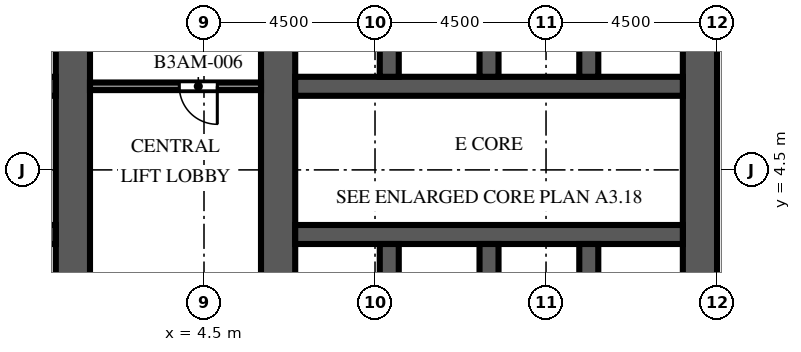
"""IFC4 building model, lengths in metres.
Left out: names, types, materials, properties, quantities, classifications, styles, units other than length and angle.
Written with IfcOpenShell. Run it as: python <this file> out.ifc"""

import sys

from ifc_helpers import new_model, si_unit, direction, frame, frame_2d, origin, place, context, subcontext, project, spatial, rectangle, extrude, element, fill, save


model = new_model("IFC4")
c1 = context("Model", 3, precision=1e-05, world=origin(), true_north=direction((0.0, 1.0)))
c2 = subcontext(c1, "Body", "Model", "MODEL_VIEW")
j1 = project(units=[si_unit("LENGTHUNIT", "METRE"), si_unit("PLANEANGLEUNIT", "RADIAN")], contexts=[c1])
p1 = place(None, origin())
s1 = spatial("IfcSite", under=j1, at=p1, CompositionType="ELEMENT")
p2 = place(p1, origin())
s2 = spatial("IfcBuilding", under=s1, at=p2, CompositionType="ELEMENT")
p3 = place(p2, frame((0.0, 0.0, 110.7)))
s3 = spatial("IfcBuildingStorey", under=s2, at=p3, CompositionType="ELEMENT", Elevation=110.7)
p4 = place(p3, frame((1.05, -9.0, 0.0), z_axis=(0.0, 0.0, 1.0), x_axis=(0.0, 1.0, 0.0)))
e1 = element("IfcWall", 1, at=p4, inside=s3, PredefinedType="SHEAR", context=c2, shape_type="SweptSolid", body=[
    extrude(rectangle(XDim=27.5, YDim=0.9, at=frame_2d((13.75, 0.0))), origin(), (0.0, 0.0, 1.0), 6.0),
])
p5 = place(p4, frame((12.55, 0.0, 0.0)))
e2 = element("IfcOpeningElement", 2, at=p5, cuts=e1, PredefinedType="OPENING", context=c2, shape_type="SweptSolid", body=[
    extrude(rectangle(XDim=2.4, YDim=2.4, at=frame_2d((1.2, 1.2))), frame((0.0, 0.46, 0.0), z_axis=(0.0, -1.0, 0.0), x_axis=(1.0, 0.0, 0.0)), (0.0, 0.0, 1.0), 0.92),
])
p6 = place(p4, frame((3.975, 0.0, 0.0)))
e3 = element("IfcOpeningElement", 3, at=p6, cuts=e1, PredefinedType="OPENING", context=c2, shape_type="SweptSolid", body=[
    extrude(rectangle(XDim=1.2, YDim=2.1, at=frame_2d((0.6, 1.05))), frame((0.0, 0.46, 0.0), z_axis=(0.0, -1.0, 0.0), x_axis=(1.0, 0.0, 0.0)), (0.0, 0.0, 1.0), 0.92),
])
p7 = place(p4, frame((19.485, 0.0, 0.0)))
e4 = element("IfcOpeningElement", 4, at=p7, cuts=e1, PredefinedType="OPENING", context=c2, shape_type="SweptSolid", body=[
    extrude(rectangle(XDim=1.0, YDim=2.1, at=frame_2d((0.5, 1.05))), frame((0.0, 0.46, 0.0), z_axis=(0.0, -1.0, 0.0), x_axis=(1.0, 0.0, 0.0)), (0.0, 0.0, 1.0), 0.92),
])
p8 = place(p4, frame((21.139, 0.0, 0.0)))
e5 = element("IfcOpeningElement", 5, at=p8, cuts=e1, PredefinedType="OPENING", context=c2, shape_type="SweptSolid", body=[
    extrude(rectangle(XDim=1.0, YDim=2.1, at=frame_2d((0.5, 1.05))), frame((0.0, 0.46, 0.0), z_axis=(0.0, -1.0, 0.0), x_axis=(1.0, 0.0, 0.0)), (0.0, 0.0, 1.0), 0.92),
])
p9 = place(p4, frame((23.16, 0.0, 0.0)))
e6 = element("IfcOpeningElement", 6, at=p9, cuts=e1, PredefinedType="OPENING", context=c2, shape_type="SweptSolid", body=[
    extrude(rectangle(XDim=1.0, YDim=2.1, at=frame_2d((0.5, 1.05))), frame((0.0, 0.46, 0.0), z_axis=(0.0, -1.0, 0.0), x_axis=(1.0, 0.0, 0.0)), (0.0, 0.0, 1.0), 0.92),
])
p10 = place(p4, frame((25.181, 0.0, 0.0)))
e7 = element("IfcOpeningElement", 7, at=p10, cuts=e1, PredefinedType="OPENING", context=c2, shape_type="SweptSolid", body=[
    extrude(rectangle(XDim=1.0, YDim=2.1, at=frame_2d((0.5, 1.05))), frame((0.0, 0.46, 0.0), z_axis=(0.0, -1.0, 0.0), x_axis=(1.0, 0.0, 0.0)), (0.0, 0.0, 1.0), 0.92),
])
p11 = place(p3, frame((-9.6, 2.8, 0.0), z_axis=(0.0, 0.0, 1.0), x_axis=(1.0, 0.0, 0.0)))
e8 = element("IfcWall", 8, at=p11, inside=s3, PredefinedType="SHEAR", context=c2, shape_type="SweptSolid", body=[
    extrude(rectangle(XDim=10.2, YDim=0.5, at=frame_2d((5.1, 0.0))), origin(), (0.0, 0.0, 1.0), 6.0),
])
p12 = place(p11, frame((0.562, 0.0, 0.0)))
e9 = element("IfcOpeningElement", 9, at=p12, cuts=e8, PredefinedType="OPENING", context=c2, shape_type="SweptSolid", body=[
    extrude(rectangle(XDim=1.1, YDim=2.1, at=frame_2d((0.55, 1.05))), frame((0.0, 0.26, 0.0), z_axis=(0.0, -1.0, 0.0), x_axis=(1.0, 0.0, 0.0)), (0.0, 0.0, 1.0), 0.52),
])
p13 = place(p11, frame((3.238, 0.0, 0.0)))
e10 = element("IfcOpeningElement", 10, at=p13, cuts=e8, PredefinedType="OPENING", context=c2, shape_type="SweptSolid", body=[
    extrude(rectangle(XDim=1.1, YDim=2.1, at=frame_2d((0.55, 1.05))), frame((0.0, 0.26, 0.0), z_axis=(0.0, -1.0, 0.0), x_axis=(1.0, 0.0, 0.0)), (0.0, 0.0, 1.0), 0.52),
])
p14 = place(p11, frame((8.538, 0.0, 0.0)))
e11 = element("IfcOpeningElement", 11, at=p14, cuts=e8, PredefinedType="OPENING", context=c2, shape_type="SweptSolid", body=[
    extrude(rectangle(XDim=1.1, YDim=2.1, at=frame_2d((0.55, 1.05))), frame((0.0, 0.26, 0.0), z_axis=(0.0, -1.0, 0.0), x_axis=(1.0, 0.0, 0.0)), (0.0, 0.0, 1.0), 0.52),
])
p15 = place(p3, frame((-9.6, 6.7, 0.0), z_axis=(0.0, 0.0, 1.0), x_axis=(1.0, 0.0, 0.0)))
e12 = element("IfcWall", 12, at=p15, inside=s3, PredefinedType="SHEAR", context=c2, shape_type="SweptSolid", body=[
    extrude(rectangle(XDim=10.2, YDim=0.5, at=frame_2d((5.1, 0.0))), origin(), (0.0, 0.0, 1.0), 6.0),
])
p16 = place(p15, frame((0.562, 0.0, 0.0)))
e13 = element("IfcOpeningElement", 13, at=p16, cuts=e12, PredefinedType="OPENING", context=c2, shape_type="SweptSolid", body=[
    extrude(rectangle(XDim=1.1, YDim=2.1, at=frame_2d((0.55, 1.05))), frame((0.0, 0.26, 0.0), z_axis=(0.0, -1.0, 0.0), x_axis=(1.0, 0.0, 0.0)), (0.0, 0.0, 1.0), 0.52),
])
p17 = place(p15, frame((3.288, 0.0, 0.0)))
e14 = element("IfcOpeningElement", 14, at=p17, cuts=e12, PredefinedType="OPENING", context=c2, shape_type="SweptSolid", body=[
    extrude(rectangle(XDim=1.0, YDim=2.1, at=frame_2d((0.5, 1.05))), frame((0.0, 0.26, 0.0), z_axis=(0.0, -1.0, 0.0), x_axis=(1.0, 0.0, 0.0)), (0.0, 0.0, 1.0), 0.52),
])
p18 = place(p15, frame((5.913, 0.0, 0.0)))
e15 = element("IfcOpeningElement", 15, at=p18, cuts=e12, PredefinedType="OPENING", context=c2, shape_type="SweptSolid", body=[
    extrude(rectangle(XDim=1.0, YDim=2.1, at=frame_2d((0.5, 1.05))), frame((0.0, 0.26, 0.0), z_axis=(0.0, -1.0, 0.0), x_axis=(1.0, 0.0, 0.0)), (0.0, 0.0, 1.0), 0.52),
])
p19 = place(p15, frame((8.587, 0.0, 0.0)))
e16 = element("IfcOpeningElement", 16, at=p19, cuts=e12, PredefinedType="OPENING", context=c2, shape_type="SweptSolid", body=[
    extrude(rectangle(XDim=1.0, YDim=2.1, at=frame_2d((0.5, 1.05))), frame((0.0, 0.26, 0.0), z_axis=(0.0, -1.0, 0.0), x_axis=(1.0, 0.0, 0.0)), (0.0, 0.0, 1.0), 0.52),
])
p20 = place(p3, frame((6.45, -9.0, 0.0), z_axis=(0.0, 0.0, 1.0), x_axis=(0.0, 1.0, 0.0)))
e17 = element("IfcWall", 17, at=p20, inside=s3, PredefinedType="SHEAR", context=c2, shape_type="SweptSolid", body=[
    extrude(rectangle(XDim=27.5, YDim=0.9, at=frame_2d((13.75, 0.0))), origin(), (0.0, 0.0, 1.0), 6.0),
])
p21 = place(p20, frame((12.55, 0.0, 0.0)))
e18 = element("IfcOpeningElement", 18, at=p21, cuts=e17, PredefinedType="OPENING", context=c2, shape_type="SweptSolid", body=[
    extrude(rectangle(XDim=2.4, YDim=2.4, at=frame_2d((1.2, 1.2))), frame((0.0, 0.46, 0.0), z_axis=(0.0, -1.0, 0.0), x_axis=(1.0, 0.0, 0.0)), (0.0, 0.0, 1.0), 0.92),
])
p22 = place(p20, frame((3.975, 0.0, 0.0)))
e19 = element("IfcOpeningElement", 19, at=p22, cuts=e17, PredefinedType="OPENING", context=c2, shape_type="SweptSolid", body=[
    extrude(rectangle(XDim=1.2, YDim=2.1, at=frame_2d((0.6, 1.05))), frame((0.0, 0.46, 0.0), z_axis=(0.0, -1.0, 0.0), x_axis=(1.0, 0.0, 0.0)), (0.0, 0.0, 1.0), 0.92),
])
p23 = place(p20, frame((19.485, 0.0, 0.0)))
e20 = element("IfcOpeningElement", 20, at=p23, cuts=e17, PredefinedType="OPENING", context=c2, shape_type="SweptSolid", body=[
    extrude(rectangle(XDim=1.0, YDim=2.1, at=frame_2d((0.5, 1.05))), frame((0.0, 0.46, 0.0), z_axis=(0.0, -1.0, 0.0), x_axis=(1.0, 0.0, 0.0)), (0.0, 0.0, 1.0), 0.92),
])
p24 = place(p20, frame((21.139, 0.0, 0.0)))
e21 = element("IfcOpeningElement", 21, at=p24, cuts=e17, PredefinedType="OPENING", context=c2, shape_type="SweptSolid", body=[
    extrude(rectangle(XDim=1.0, YDim=2.1, at=frame_2d((0.5, 1.05))), frame((0.0, 0.46, 0.0), z_axis=(0.0, -1.0, 0.0), x_axis=(1.0, 0.0, 0.0)), (0.0, 0.0, 1.0), 0.92),
])
p25 = place(p20, frame((23.16, 0.0, 0.0)))
e22 = element("IfcOpeningElement", 22, at=p25, cuts=e17, PredefinedType="OPENING", context=c2, shape_type="SweptSolid", body=[
    extrude(rectangle(XDim=1.0, YDim=2.1, at=frame_2d((0.5, 1.05))), frame((0.0, 0.46, 0.0), z_axis=(0.0, -1.0, 0.0), x_axis=(1.0, 0.0, 0.0)), (0.0, 0.0, 1.0), 0.92),
])
p26 = place(p20, frame((25.181, 0.0, 0.0)))
e23 = element("IfcOpeningElement", 23, at=p26, cuts=e17, PredefinedType="OPENING", context=c2, shape_type="SweptSolid", body=[
    extrude(rectangle(XDim=1.0, YDim=2.1, at=frame_2d((0.5, 1.05))), frame((0.0, 0.46, 0.0), z_axis=(0.0, -1.0, 0.0), x_axis=(1.0, 0.0, 0.0)), (0.0, 0.0, 1.0), 0.92),
])
p27 = place(p3, frame((17.55, -9.0, 0.0), z_axis=(0.0, 0.0, 1.0), x_axis=(0.0, 1.0, 0.0)))
e24 = element("IfcWall", 24, at=p27, inside=s3, PredefinedType="SHEAR", context=c2, shape_type="SweptSolid", body=[
    extrude(rectangle(XDim=27.5, YDim=0.9, at=frame_2d((13.75, 0.0))), origin(), (0.0, 0.0, 1.0), 6.0),
])
p28 = place(p27, frame((12.55, 0.0, 0.0)))
e25 = element("IfcOpeningElement", 25, at=p28, cuts=e24, PredefinedType="OPENING", context=c2, shape_type="SweptSolid", body=[
    extrude(rectangle(XDim=2.4, YDim=2.4, at=frame_2d((1.2, 1.2))), frame((0.0, 0.46, 0.0), z_axis=(0.0, -1.0, 0.0), x_axis=(1.0, 0.0, 0.0)), (0.0, 0.0, 1.0), 0.92),
])
p29 = place(p27, frame((6.825, 0.0, 0.0)))
e26 = element("IfcOpeningElement", 26, at=p29, cuts=e24, PredefinedType="OPENING", context=c2, shape_type="SweptSolid", body=[
    extrude(rectangle(XDim=1.2, YDim=2.1, at=frame_2d((0.6, 1.05))), frame((0.0, 0.46, 0.0), z_axis=(0.0, -1.0, 0.0), x_axis=(1.0, 0.0, 0.0)), (0.0, 0.0, 1.0), 0.92),
])
p30 = place(p27, frame((19.475, 0.0, 0.0)))
e27 = element("IfcOpeningElement", 27, at=p30, cuts=e24, PredefinedType="OPENING", context=c2, shape_type="SweptSolid", body=[
    extrude(rectangle(XDim=1.2, YDim=2.1, at=frame_2d((0.6, 1.05))), frame((0.0, 0.46, 0.0), z_axis=(0.0, -1.0, 0.0), x_axis=(1.0, 0.0, 0.0)), (0.0, 0.0, 1.0), 0.92),
])
p31 = place(p3, frame((6.9, 2.8, 0.0), z_axis=(0.0, 0.0, 1.0), x_axis=(1.0, 0.0, 0.0)))
e28 = element("IfcWall", 28, at=p31, inside=s3, PredefinedType="SHEAR", context=c2, shape_type="SweptSolid", body=[
    extrude(rectangle(XDim=10.2, YDim=0.5, at=frame_2d((5.1, 0.0))), origin(), (0.0, 0.0, 1.0), 6.0),
])
p32 = place(p31, frame((0.562, 0.0, 0.0)))
e29 = element("IfcOpeningElement", 29, at=p32, cuts=e28, PredefinedType="OPENING", context=c2, shape_type="SweptSolid", body=[
    extrude(rectangle(XDim=1.1, YDim=2.1, at=frame_2d((0.55, 1.05))), frame((0.0, 0.26, 0.0), z_axis=(0.0, -1.0, 0.0), x_axis=(1.0, 0.0, 0.0)), (0.0, 0.0, 1.0), 0.52),
])
p33 = place(p31, frame((3.238, 0.0, 0.0)))
e30 = element("IfcOpeningElement", 30, at=p33, cuts=e28, PredefinedType="OPENING", context=c2, shape_type="SweptSolid", body=[
    extrude(rectangle(XDim=1.1, YDim=2.1, at=frame_2d((0.55, 1.05))), frame((0.0, 0.26, 0.0), z_axis=(0.0, -1.0, 0.0), x_axis=(1.0, 0.0, 0.0)), (0.0, 0.0, 1.0), 0.52),
])
p34 = place(p31, frame((8.538, 0.0, 0.0)))
e31 = element("IfcOpeningElement", 31, at=p34, cuts=e28, PredefinedType="OPENING", context=c2, shape_type="SweptSolid", body=[
    extrude(rectangle(XDim=1.1, YDim=2.1, at=frame_2d((0.55, 1.05))), frame((0.0, 0.26, 0.0), z_axis=(0.0, -1.0, 0.0), x_axis=(1.0, 0.0, 0.0)), (0.0, 0.0, 1.0), 0.52),
])
p35 = place(p3, frame((6.9, 6.7, 0.0), z_axis=(0.0, 0.0, 1.0), x_axis=(1.0, 0.0, 0.0)))
e32 = element("IfcWall", 32, at=p35, inside=s3, PredefinedType="SHEAR", context=c2, shape_type="SweptSolid", body=[
    extrude(rectangle(XDim=10.2, YDim=0.5, at=frame_2d((5.1, 0.0))), origin(), (0.0, 0.0, 1.0), 6.0),
])
p36 = place(p35, frame((0.562, 0.0, 0.0)))
e33 = element("IfcOpeningElement", 33, at=p36, cuts=e32, PredefinedType="OPENING", context=c2, shape_type="SweptSolid", body=[
    extrude(rectangle(XDim=1.1, YDim=2.1, at=frame_2d((0.55, 1.05))), frame((0.0, 0.26, 0.0), z_axis=(0.0, -1.0, 0.0), x_axis=(1.0, 0.0, 0.0)), (0.0, 0.0, 1.0), 0.52),
])
p37 = place(p35, frame((3.288, 0.0, 0.0)))
e34 = element("IfcOpeningElement", 34, at=p37, cuts=e32, PredefinedType="OPENING", context=c2, shape_type="SweptSolid", body=[
    extrude(rectangle(XDim=1.0, YDim=2.1, at=frame_2d((0.5, 1.05))), frame((0.0, 0.26, 0.0), z_axis=(0.0, -1.0, 0.0), x_axis=(1.0, 0.0, 0.0)), (0.0, 0.0, 1.0), 0.52),
])
p38 = place(p35, frame((5.913, 0.0, 0.0)))
e35 = element("IfcOpeningElement", 35, at=p38, cuts=e32, PredefinedType="OPENING", context=c2, shape_type="SweptSolid", body=[
    extrude(rectangle(XDim=1.0, YDim=2.1, at=frame_2d((0.5, 1.05))), frame((0.0, 0.26, 0.0), z_axis=(0.0, -1.0, 0.0), x_axis=(1.0, 0.0, 0.0)), (0.0, 0.0, 1.0), 0.52),
])
p39 = place(p35, frame((8.587, 0.0, 0.0)))
e36 = element("IfcOpeningElement", 36, at=p39, cuts=e32, PredefinedType="OPENING", context=c2, shape_type="SweptSolid", body=[
    extrude(rectangle(XDim=1.0, YDim=2.1, at=frame_2d((0.5, 1.05))), frame((0.0, 0.26, 0.0), z_axis=(0.0, -1.0, 0.0), x_axis=(1.0, 0.0, 0.0)), (0.0, 0.0, 1.0), 0.52),
])
for number, where, z_axis, x_axis in (
    (37, (9.375, -0.25, 0.0), (0.0, 0.0, 1.0), (0.0, 1.0, 0.0)),
    (38, (9.375, 6.95, 0.0), (0.0, 0.0, 1.0), (0.0, 1.0, 0.0)),
    (39, (12.0, -0.25, 0.0), (0.0, 0.0, 1.0), (0.0, 1.0, 0.0)),
    (40, (12.0, 6.95, 0.0), (0.0, 0.0, 1.0), (0.0, 1.0, 0.0)),
    (41, (14.625, -0.25, 0.0), (0.0, 0.0, 1.0), (0.0, 1.0, 0.0)),
    (42, (14.625, 6.95, 0.0), (0.0, 0.0, 1.0), (0.0, 1.0, 0.0)),
):
    element("IfcWall", number, at=place(p3, frame(where, z_axis=z_axis, x_axis=x_axis)), inside=s3, PredefinedType="SHEAR", context=c2, shape_type="SweptSolid", body=[
        extrude(rectangle(XDim=2.8, YDim=0.5, at=frame_2d((1.4, 0.0))), origin(), (0.0, 0.0, 1.0), 6.0),
    ])
p40 = place(p3, frame((1.5, 6.7, 0.0), z_axis=(0.0, 0.0, 1.0), x_axis=(1.0, 0.0, 0.0)))
e43 = element("IfcWall", 43, at=p40, inside=s3, PredefinedType="PARTITIONING", context=c2, shape_type="SweptSolid", body=[
    extrude(rectangle(XDim=4.5, YDim=0.2, at=frame_2d((2.25, 0.0))), origin(), (0.0, 0.0, 1.0), 5.55),
])
p41 = place(p40, frame((2.35, 0.0, 0.0)))
e44 = element("IfcOpeningElement", 44, at=p41, cuts=e43, PredefinedType="OPENING", context=c2, shape_type="SweptSolid", body=[
    extrude(rectangle(XDim=1.0, YDim=2.1, at=frame_2d((0.5, 1.05))), frame((0.0, 0.11, 0.0), z_axis=(0.0, -1.0, 0.0), x_axis=(1.0, 0.0, 0.0)), (0.0, 0.0, 1.0), 0.22),
])
p42 = place(p32, origin())
e45 = element("IfcDoor", 45, at=p42, inside=s3, OperationType="DOUBLE_DOOR_SLIDING", PredefinedType="DOOR", context=c2, shape_type="SweptSolid", body=[
    extrude(rectangle(XDim=1.1, YDim=2.1, at=frame_2d((0.55, 1.05))), frame((0.0, 0.025, 0.0), z_axis=(0.0, -1.0, 0.0), x_axis=(1.0, 0.0, 0.0)), (0.0, 0.0, 1.0), 0.05),
])
fill(e29, e45)
p43 = place(p33, origin())
e46 = element("IfcDoor", 46, at=p43, inside=s3, OperationType="DOUBLE_DOOR_SLIDING", PredefinedType="DOOR", context=c2, shape_type="SweptSolid", body=[
    extrude(rectangle(XDim=1.1, YDim=2.1, at=frame_2d((0.55, 1.05))), frame((0.0, 0.025, 0.0), z_axis=(0.0, -1.0, 0.0), x_axis=(1.0, 0.0, 0.0)), (0.0, 0.0, 1.0), 0.05),
])
fill(e30, e46)
p44 = place(p34, origin())
e47 = element("IfcDoor", 47, at=p44, inside=s3, OperationType="DOUBLE_DOOR_SLIDING", PredefinedType="DOOR", context=c2, shape_type="SweptSolid", body=[
    extrude(rectangle(XDim=1.1, YDim=2.1, at=frame_2d((0.55, 1.05))), frame((0.0, 0.025, 0.0), z_axis=(0.0, -1.0, 0.0), x_axis=(1.0, 0.0, 0.0)), (0.0, 0.0, 1.0), 0.05),
])
fill(e31, e47)
p45 = place(p36, origin())
e48 = element("IfcDoor", 48, at=p45, inside=s3, OperationType="DOUBLE_DOOR_SLIDING", PredefinedType="DOOR", context=c2, shape_type="SweptSolid", body=[
    extrude(rectangle(XDim=1.1, YDim=2.1, at=frame_2d((0.55, 1.05))), frame((0.0, 0.025, 0.0), z_axis=(0.0, -1.0, 0.0), x_axis=(1.0, 0.0, 0.0)), (0.0, 0.0, 1.0), 0.05),
])
fill(e33, e48)
p46 = place(p5, origin())
e49 = element("IfcDoor", 49, at=p46, inside=s3, OperationType="DOUBLE_DOOR_DOUBLE_SWING", PredefinedType="DOOR", context=c2, shape_type="SweptSolid", body=[
    extrude(rectangle(XDim=2.4, YDim=2.4, at=frame_2d((1.2, 1.2))), frame((0.0, 0.025, 0.0), z_axis=(0.0, -1.0, 0.0), x_axis=(1.0, 0.0, 0.0)), (0.0, 0.0, 1.0), 0.05),
])
fill(e2, e49)
p47 = place(p21, origin())
e50 = element("IfcDoor", 50, at=p47, inside=s3, OperationType="DOUBLE_DOOR_DOUBLE_SWING", PredefinedType="DOOR", context=c2, shape_type="SweptSolid", body=[
    extrude(rectangle(XDim=2.4, YDim=2.4, at=frame_2d((1.2, 1.2))), frame((0.0, 0.025, 0.0), z_axis=(0.0, -1.0, 0.0), x_axis=(1.0, 0.0, 0.0)), (0.0, 0.0, 1.0), 0.05),
])
fill(e18, e50)
p48 = place(p28, origin())
e51 = element("IfcDoor", 51, at=p48, inside=s3, OperationType="DOUBLE_DOOR_DOUBLE_SWING", PredefinedType="DOOR", context=c2, shape_type="SweptSolid", body=[
    extrude(rectangle(XDim=2.4, YDim=2.4, at=frame_2d((1.2, 1.2))), frame((0.0, 0.025, 0.0), z_axis=(0.0, -1.0, 0.0), x_axis=(1.0, 0.0, 0.0)), (0.0, 0.0, 1.0), 0.05),
])
fill(e25, e51)
p49 = place(p37, origin())
e52 = element("IfcDoor", 52, at=p49, inside=s3, OperationType="SINGLE_SWING_RIGHT", PredefinedType="DOOR", context=c2, shape_type="SweptSolid", body=[
    extrude(rectangle(XDim=1.0, YDim=2.1, at=frame_2d((0.5, 1.05))), frame((0.0, 0.025, 0.0), z_axis=(0.0, -1.0, 0.0), x_axis=(1.0, 0.0, 0.0)), (0.0, 0.0, 1.0), 0.05),
])
fill(e34, e52)
p50 = place(p38, origin())
e53 = element("IfcDoor", 53, at=p50, inside=s3, OperationType="SINGLE_SWING_LEFT", PredefinedType="DOOR", context=c2, shape_type="SweptSolid", body=[
    extrude(rectangle(XDim=1.0, YDim=2.1, at=frame_2d((0.5, 1.05))), frame((0.0, 0.025, 0.0), z_axis=(0.0, -1.0, 0.0), x_axis=(1.0, 0.0, 0.0)), (0.0, 0.0, 1.0), 0.05),
])
fill(e35, e53)
p51 = place(p39, origin())
e54 = element("IfcDoor", 54, at=p51, inside=s3, OperationType="SINGLE_SWING_RIGHT", PredefinedType="DOOR", context=c2, shape_type="SweptSolid", body=[
    extrude(rectangle(XDim=1.0, YDim=2.1, at=frame_2d((0.5, 1.05))), frame((0.0, 0.025, 0.0), z_axis=(0.0, -1.0, 0.0), x_axis=(1.0, 0.0, 0.0)), (0.0, 0.0, 1.0), 0.05),
])
fill(e36, e54)
p52 = place(p41, origin())
e55 = element("IfcDoor", 55, at=p52, inside=s3, OperationType="SINGLE_SWING_RIGHT", PredefinedType="DOOR", context=c2, shape_type="SweptSolid", body=[
    extrude(rectangle(XDim=1.0, YDim=2.1, at=frame_2d((0.5, 1.05))), frame((0.0, 0.025, 0.0), z_axis=(0.0, -1.0, 0.0), x_axis=(1.0, 0.0, 0.0)), (0.0, 0.0, 1.0), 0.05),
])
fill(e44, e55)
save(model, sys.argv[1])
